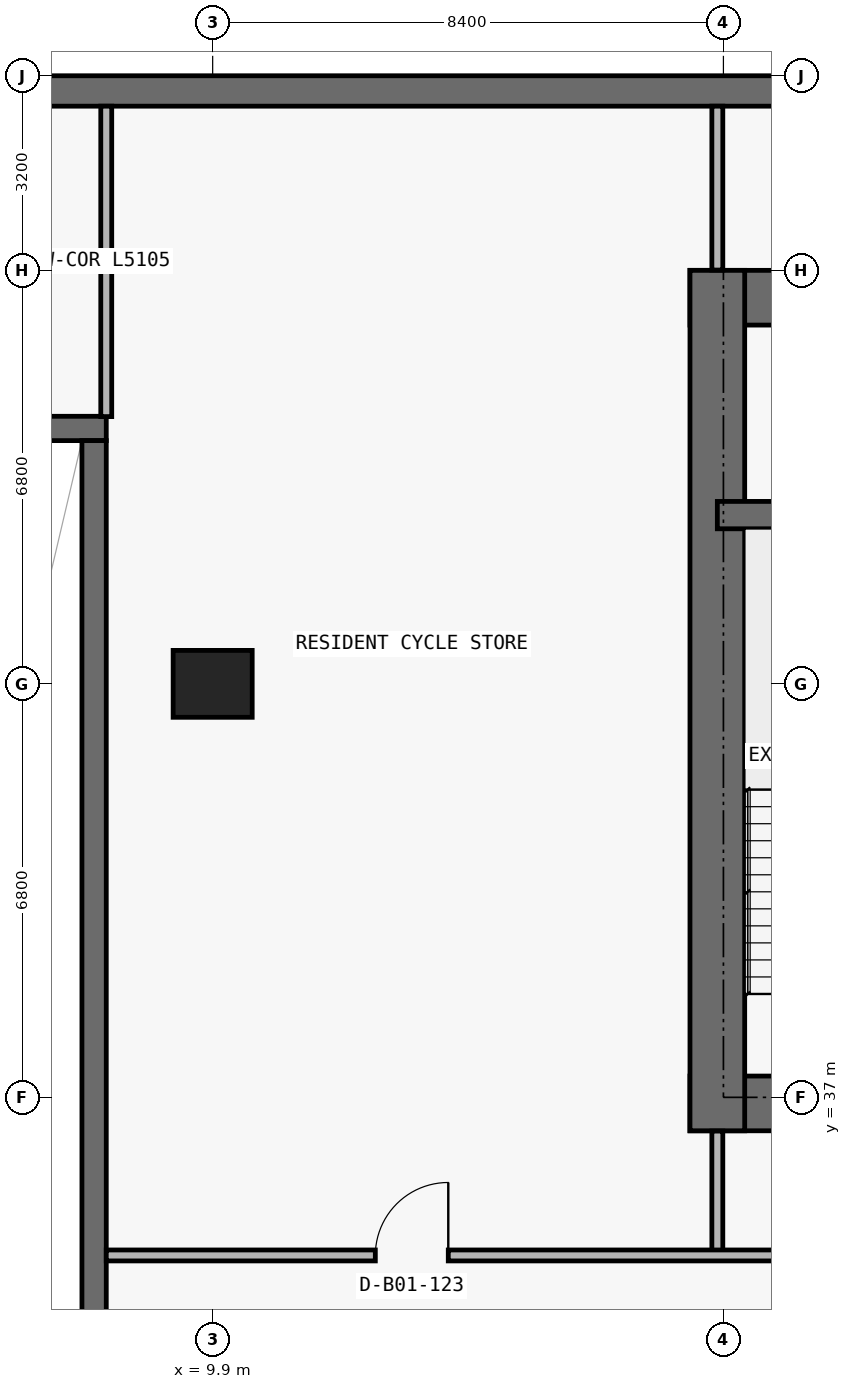
"""IFC4 building model, lengths in metres.
Left out: names, types, materials, properties, quantities, classifications, styles, units other than length and angle.
Written with IfcOpenShell. Run it as: python <this file> out.ifc"""

import sys

from ifc_helpers import new_model, si_unit, direction, frame, frame_2d, origin, origin_2d, place, context, subcontext, project, spatial, rectangle, extrude, element, fill, save


model = new_model("IFC4")
c1 = context("Model", 3, precision=1e-05, world=origin(), true_north=direction((0.0, 1.0)))
c2 = subcontext(c1, "Body", "Model", "MODEL_VIEW")
j1 = project(units=[si_unit("LENGTHUNIT", "METRE"), si_unit("PLANEANGLEUNIT", "RADIAN")], contexts=[c1])
p1 = place(None, origin())
s1 = spatial("IfcSite", under=j1, at=p1, CompositionType="ELEMENT")
p2 = place(p1, origin())
s2 = spatial("IfcBuilding", under=s1, at=p2, CompositionType="ELEMENT")
p3 = place(p2, frame((0.0, 0.0, -4.5)))
s3 = spatial("IfcBuildingStorey", under=s2, at=p3, CompositionType="ELEMENT", Elevation=-4.5)
p4 = place(p3, frame((0.0, 53.55, 0.0), z_axis=(0.0, 0.0, 1.0), x_axis=(1.0, 0.0, 0.0)))
e1 = element("IfcWall", 1, at=p4, inside=s3, PredefinedType="SOLIDWALL", context=c2, shape_type="SweptSolid", body=[
    extrude(rectangle(XDim=77.8, YDim=0.5, at=frame_2d((38.9, 0.0))), origin(), (0.0, 0.0, 1.0), 4.2),
])
p5 = place(p3, frame((1.75, 48.0, 0.0), z_axis=(0.0, 0.0, 1.0), x_axis=(1.0, 0.0, 0.0)))
e2 = element("IfcWall", 2, at=p5, inside=s3, PredefinedType="SHEAR", context=c2, shape_type="SweptSolid", body=[
    extrude(rectangle(XDim=6.4, YDim=0.4, at=frame_2d((3.2, 0.0))), origin(), (0.0, 0.0, 1.0), 4.2),
])
p6 = place(p3, frame((7.95, 23.6, 0.0), z_axis=(0.0, 0.0, 1.0), x_axis=(0.0, 1.0, 0.0)))
e3 = element("IfcWall", 3, at=p6, inside=s3, PredefinedType="SHEAR", context=c2, shape_type="SweptSolid", body=[
    extrude(rectangle(XDim=24.2, YDim=0.4, at=frame_2d((12.1, 0.0))), origin(), (0.0, 0.0, 1.0), 4.2),
])
p7 = place(p3, frame((9.9, 43.8, 0.0), z_axis=(0.0, 0.0, 1.0), x_axis=(1.0, 0.0, 0.0)))
e4 = element("IfcColumn", 4, at=p7, inside=s3, PredefinedType="COLUMN", context=c2, shape_type="SweptSolid", body=[
    extrude(rectangle(XDim=1.3, YDim=1.1, at=origin_2d()), origin(), (0.0, 0.0, 1.0), 4.2),
])
p8 = place(p3, frame((17.75, 36.9, 0.0), z_axis=(0.0, 0.0, 1.0), x_axis=(1.0, 0.0, 0.0)))
e5 = element("IfcWall", 5, at=p8, inside=s3, PredefinedType="SHEAR", context=c2, shape_type="SweptSolid", body=[
    extrude(rectangle(XDim=42.3, YDim=0.9, at=frame_2d((21.15, 0.0))), origin(), (0.0, 0.0, 1.0), 4.2),
])
p9 = place(p8, frame((14.55, 0.0, 0.0)))
e6 = element("IfcOpeningElement", 6, at=p9, cuts=e5, PredefinedType="OPENING", context=c2, shape_type="SweptSolid", body=[
    extrude(rectangle(XDim=1.1, YDim=2.15, at=frame_2d((0.55, 1.075))), frame((0.0, 0.46, 0.0), z_axis=(0.0, -1.0, 0.0), x_axis=(1.0, 0.0, 0.0)), (0.0, 0.0, 1.0), 0.92),
])
p10 = place(p8, frame((6.4, 0.0, 0.0)))
e7 = element("IfcOpeningElement", 7, at=p10, cuts=e5, PredefinedType="OPENING", context=c2, shape_type="SweptSolid", body=[
    extrude(rectangle(XDim=1.05, YDim=2.15, at=frame_2d((0.525, 1.075))), frame((0.0, 0.46, 0.0), z_axis=(0.0, -1.0, 0.0), x_axis=(1.0, 0.0, 0.0)), (0.0, 0.0, 1.0), 0.92),
])
p11 = place(p8, frame((34.9, 0.0, 0.0)))
e8 = element("IfcOpeningElement", 8, at=p11, cuts=e5, PredefinedType="OPENING", context=c2, shape_type="SweptSolid", body=[
    extrude(rectangle(XDim=1.05, YDim=2.15, at=frame_2d((0.525, 1.075))), frame((0.0, 0.46, 0.0), z_axis=(0.0, -1.0, 0.0), x_axis=(1.0, 0.0, 0.0)), (0.0, 0.0, 1.0), 0.92),
])
p12 = place(p8, frame((11.012, 0.0, 0.0)))
e9 = element("IfcOpeningElement", 9, at=p12, cuts=e5, PredefinedType="OPENING", context=c2, shape_type="SweptSolid", body=[
    extrude(rectangle(XDim=1.05, YDim=2.15, at=frame_2d((0.525, 1.075))), frame((0.0, 0.46, 0.0), z_axis=(0.0, -1.0, 0.0), x_axis=(1.0, 0.0, 0.0)), (0.0, 0.0, 1.0), 0.92),
])
p13 = place(p8, frame((24.25, 0.0, 0.0)))
e10 = element("IfcOpeningElement", 10, at=p13, cuts=e5, PredefinedType="OPENING", context=c2, shape_type="SweptSolid", body=[
    extrude(rectangle(XDim=1.05, YDim=2.15, at=frame_2d((0.525, 1.075))), frame((0.0, 0.46, 0.0), z_axis=(0.0, -1.0, 0.0), x_axis=(1.0, 0.0, 0.0)), (0.0, 0.0, 1.0), 0.92),
])
p14 = place(p3, frame((17.75, 50.15, 0.0), z_axis=(0.0, 0.0, 1.0), x_axis=(1.0, 0.0, 0.0)))
e11 = element("IfcWall", 11, at=p14, inside=s3, PredefinedType="SHEAR", context=c2, shape_type="SweptSolid", body=[
    extrude(rectangle(XDim=42.3, YDim=0.9, at=frame_2d((21.15, 0.0))), origin(), (0.0, 0.0, 1.0), 4.2),
])
p15 = place(p3, frame((18.2, 36.45, 0.0), z_axis=(0.0, 0.0, 1.0), x_axis=(0.0, 1.0, 0.0)))
e12 = element("IfcWall", 12, at=p15, inside=s3, PredefinedType="SHEAR", context=c2, shape_type="SweptSolid", body=[
    extrude(rectangle(XDim=14.15, YDim=0.9, at=frame_2d((7.075, 0.0))), origin(), (0.0, 0.0, 1.0), 4.2),
])
p16 = place(p3, frame((18.2, 46.575, 0.0), z_axis=(0.0, 0.0, 1.0), x_axis=(1.0, 0.0, 0.0)))
e13 = element("IfcWall", 13, at=p16, inside=s3, PredefinedType="SHEAR", context=c2, shape_type="SweptSolid", body=[
    extrude(rectangle(XDim=41.4, YDim=0.45, at=frame_2d((20.7, 0.0))), origin(), (0.0, 0.0, 1.0), 4.2),
])
p17 = place(p16, frame((7.675, 0.0, 0.0)))
e14 = element("IfcOpeningElement", 14, at=p17, cuts=e13, PredefinedType="OPENING", context=c2, shape_type="SweptSolid", body=[
    extrude(rectangle(XDim=1.05, YDim=2.15, at=frame_2d((0.525, 1.075))), frame((0.0, 0.235, 0.0), z_axis=(0.0, -1.0, 0.0), x_axis=(1.0, 0.0, 0.0)), (0.0, 0.0, 1.0), 0.47),
])
p18 = place(p16, frame((32.725, 0.0, 0.0)))
e15 = element("IfcOpeningElement", 15, at=p18, cuts=e13, PredefinedType="OPENING", context=c2, shape_type="SweptSolid", body=[
    extrude(rectangle(XDim=1.05, YDim=2.15, at=frame_2d((0.525, 1.075))), frame((0.0, 0.235, 0.0), z_axis=(0.0, -1.0, 0.0), x_axis=(1.0, 0.0, 0.0)), (0.0, 0.0, 1.0), 0.47),
])
p19 = place(p3, frame((8.15, 48.195, 0.0), z_axis=(0.0, 0.0, 1.0), x_axis=(0.0, 1.0, 0.0)))
e16 = element("IfcWall", 16, at=p19, inside=s3, PredefinedType="PARTITIONING", context=c2, shape_type="SweptSolid", body=[
    extrude(rectangle(XDim=5.105, YDim=0.18, at=frame_2d((2.552, 0.0))), origin(), (0.0, 0.0, 1.0), 4.2),
])
p20 = place(p3, frame((18.2, 34.4, 0.0), z_axis=(0.0, 0.0, 1.0), x_axis=(0.0, 1.0, 0.0)))
e17 = element("IfcWall", 17, at=p20, inside=s3, PredefinedType="PARTITIONING", context=c2, shape_type="SweptSolid", body=[
    extrude(rectangle(XDim=2.045, YDim=0.18, at=frame_2d((1.022, 0.0))), origin(), (0.0, 0.0, 1.0), 3.085),
])
p21 = place(p3, frame((18.2, 50.605, 0.0), z_axis=(0.0, 0.0, 1.0), x_axis=(0.0, 1.0, 0.0)))
e18 = element("IfcWall", 18, at=p21, inside=s3, PredefinedType="PARTITIONING", context=c2, shape_type="SweptSolid", body=[
    extrude(rectangle(XDim=2.695, YDim=0.18, at=frame_2d((1.348, 0.0))), origin(), (0.0, 0.0, 1.0), 4.2),
])
p22 = place(p3, frame((8.15, 34.4, 0.0), z_axis=(0.0, 0.0, 1.0), x_axis=(1.0, 0.0, 0.0)))
e19 = element("IfcWall", 19, at=p22, inside=s3, PredefinedType="PARTITIONING", context=c2, shape_type="SweptSolid", body=[
    extrude(rectangle(XDim=61.5, YDim=0.18, at=frame_2d((30.75, 0.0))), origin(), (0.0, 0.0, 1.0), 4.2),
])
p23 = place(p22, frame((30.15, 0.0, 0.0)))
e20 = element("IfcOpeningElement", 20, at=p23, cuts=e19, PredefinedType="OPENING", context=c2, shape_type="SweptSolid", body=[
    extrude(rectangle(XDim=1.2, YDim=2.2, at=frame_2d((0.6, 1.1))), frame((0.0, 0.1, 0.0), z_axis=(0.0, -1.0, 0.0), x_axis=(1.0, 0.0, 0.0)), (0.0, 0.0, 1.0), 0.2),
])
p24 = place(p22, frame((4.425, 0.0, 0.0)))
e21 = element("IfcOpeningElement", 21, at=p24, cuts=e19, PredefinedType="OPENING", context=c2, shape_type="SweptSolid", body=[
    extrude(rectangle(XDim=1.2, YDim=2.2, at=frame_2d((0.6, 1.1))), frame((0.0, 0.1, 0.0), z_axis=(0.0, -1.0, 0.0), x_axis=(1.0, 0.0, 0.0)), (0.0, 0.0, 1.0), 0.2),
])
p25 = place(p22, frame((55.875, 0.0, 0.0)))
e22 = element("IfcOpeningElement", 22, at=p25, cuts=e19, PredefinedType="OPENING", context=c2, shape_type="SweptSolid", body=[
    extrude(rectangle(XDim=1.2, YDim=2.2, at=frame_2d((0.6, 1.1))), frame((0.0, 0.1, 0.0), z_axis=(0.0, -1.0, 0.0), x_axis=(1.0, 0.0, 0.0)), (0.0, 0.0, 1.0), 0.2),
])
p26 = place(p24, origin())
e23 = element("IfcDoor", 23, at=p26, inside=s3, OperationType="SINGLE_SWING_RIGHT", PredefinedType="DOOR", context=c2, shape_type="SweptSolid", body=[
    extrude(rectangle(XDim=1.2, YDim=2.2, at=frame_2d((0.6, 1.1))), frame((0.0, 0.025, 0.0), z_axis=(0.0, -1.0, 0.0), x_axis=(1.0, 0.0, 0.0)), (0.0, 0.0, 1.0), 0.05),
])
fill(e21, e23)
save(model, sys.argv[1])
